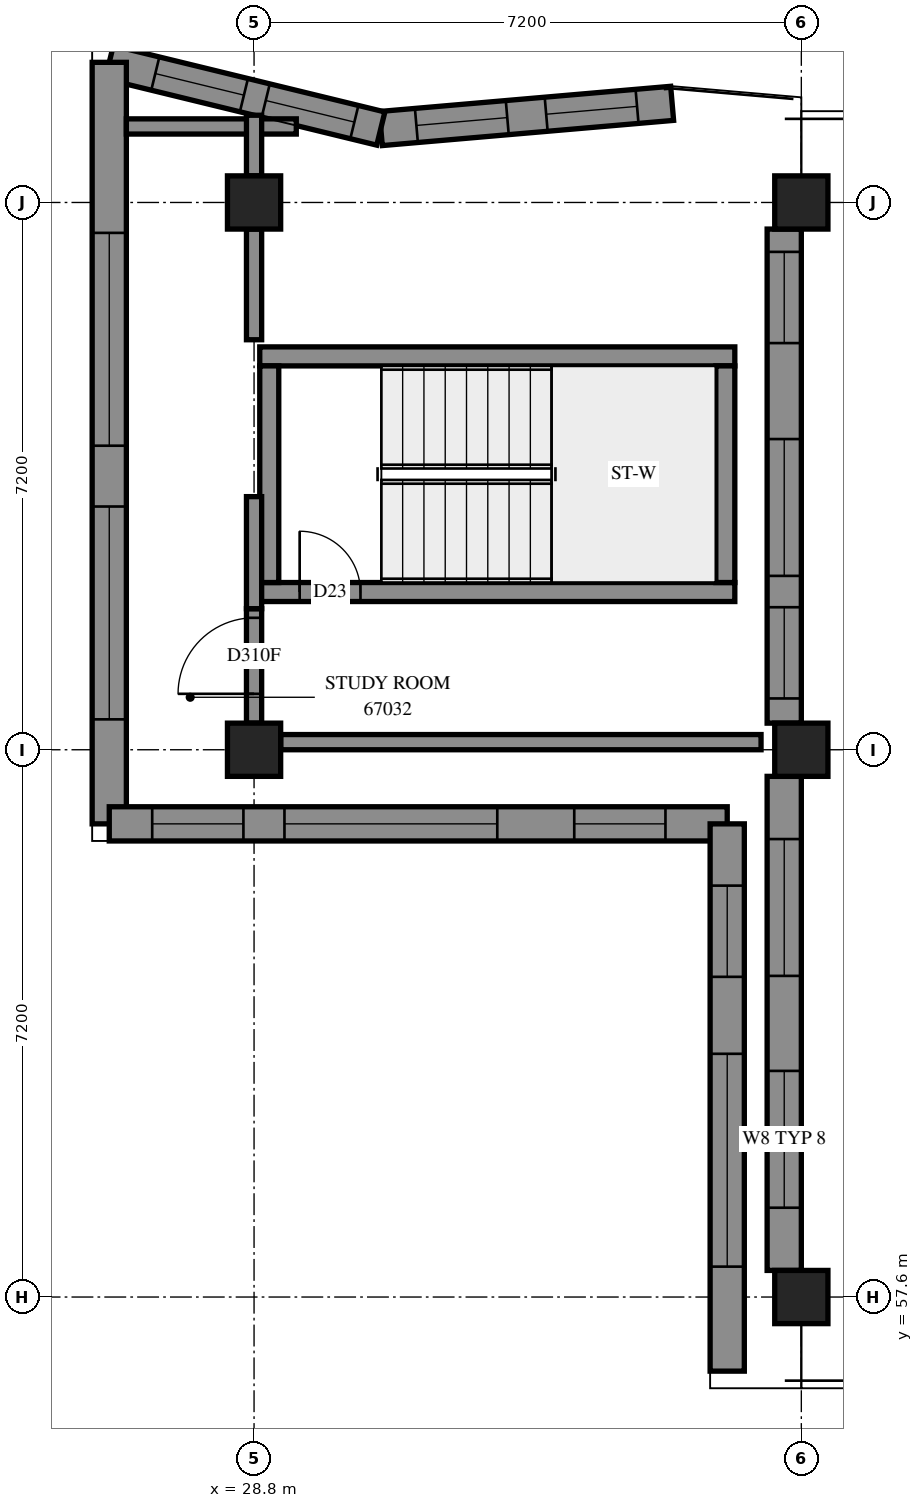
"""IFC4 building model, lengths in metres.
Left out: names, types, materials, properties, quantities, classifications, styles, units other than length and angle.
Written with IfcOpenShell. Run it as: python <this file> out.ifc"""

import sys

from ifc_helpers import new_model, si_unit, direction, frame, frame_2d, origin, origin_2d, place, context, subcontext, project, spatial, polyline, rectangle, outline, extrude, element, fill, save


model = new_model("IFC4")
c1 = context("Model", 3, precision=1e-05, world=origin(), true_north=direction((0.0, 1.0)))
c2 = subcontext(c1, "Body", "Model", "MODEL_VIEW")
j1 = project(units=[si_unit("LENGTHUNIT", "METRE"), si_unit("PLANEANGLEUNIT", "RADIAN")], contexts=[c1])
p1 = place(None, origin())
s1 = spatial("IfcSite", under=j1, at=p1, CompositionType="ELEMENT")
p2 = place(p1, origin())
s2 = spatial("IfcBuilding", under=s1, at=p2, CompositionType="ELEMENT")
p3 = place(p2, frame((0.0, 0.0, 247.2)))
s3 = spatial("IfcBuildingStorey", under=s2, at=p3, CompositionType="ELEMENT", Elevation=247.2)
for number, where, z_axis, x_axis in (
    (1, (28.8, 64.8, 0.0), (0.0, 0.0, 1.0), (1.0, 0.0, 0.0)),
    (2, (28.8, 72.0, 0.0), (0.0, 0.0, 1.0), (1.0, 0.0, 0.0)),
    (3, (36.0, 57.6, 0.0), (0.0, 0.0, 1.0), (1.0, 0.0, 0.0)),
    (4, (36.0, 64.8, 0.0), (0.0, 0.0, 1.0), (1.0, 0.0, 0.0)),
    (5, (36.0, 72.0, 0.0), (0.0, 0.0, 1.0), (1.0, 0.0, 0.0)),
):
    element("IfcColumn", number, at=place(p3, frame(where, z_axis=z_axis, x_axis=x_axis)), inside=s3, PredefinedType="COLUMN", context=c2, shape_type="SweptSolid", body=[
        extrude(rectangle(XDim=0.7, YDim=0.7, at=origin_2d()), origin(), (0.0, 0.0, 1.0), 3.1),
    ])
p4 = place(p3, frame((34.3, 73.304, 0.0), z_axis=(0.0, 0.0, 1.0), x_axis=(-0.9962799901, -0.0861752946, 0.0)))
e6 = element("IfcWall", 6, at=p4, inside=s3, PredefinedType="SOLIDWALL", context=c2, shape_type="SweptSolid", body=[
    extrude(outline(polyline([(-0.019, -0.225), (3.81, -0.225), (3.884, 0.225), (0.019, 0.225), (-0.019, -0.225)])), origin(), (0.0, 0.0, 1.0), 3.1),
])
p5 = place(p4, frame((0.463, 0.0, 0.45)))
e7 = element("IfcOpeningElement", 7, at=p5, cuts=e6, PredefinedType="OPENING", context=c2, shape_type="SweptSolid", body=[
    extrude(rectangle(XDim=1.2, YDim=2.55, at=frame_2d((0.6, 1.275))), frame((0.0, 0.235, 0.0), z_axis=(0.0, -1.0, 0.0), x_axis=(1.0, 0.0, 0.0)), (0.0, 0.0, 1.0), 0.47),
])
p6 = place(p4, frame((2.177, 0.0, 0.45)))
e8 = element("IfcOpeningElement", 8, at=p6, cuts=e6, PredefinedType="OPENING", context=c2, shape_type="SweptSolid", body=[
    extrude(rectangle(XDim=1.2, YDim=2.55, at=frame_2d((0.6, 1.275))), frame((0.0, 0.235, 0.0), z_axis=(0.0, -1.0, 0.0), x_axis=(1.0, 0.0, 0.0)), (0.0, 0.0, 1.0), 0.47),
])
p7 = place(p3, frame((30.468, 72.973, 0.0), z_axis=(0.0, 0.0, 1.0), x_axis=(-0.9715525461, 0.236824091, 0.0)))
e9 = element("IfcWall", 9, at=p7, inside=s3, PredefinedType="SOLIDWALL", context=c2, shape_type="SweptSolid", body=[
    extrude(outline(polyline([(0.037, -0.225), (3.964, -0.225), (3.391, 0.225), (-0.037, 0.225), (0.037, -0.225)])), origin(), (0.0, 0.0, 1.0), 3.1),
])
p8 = place(p7, frame((0.358, 0.0, 0.45)))
e10 = element("IfcOpeningElement", 10, at=p8, cuts=e9, PredefinedType="OPENING", context=c2, shape_type="SweptSolid", body=[
    extrude(rectangle(XDim=1.2, YDim=2.55, at=frame_2d((0.6, 1.275))), frame((0.0, 0.235, 0.0), z_axis=(0.0, -1.0, 0.0), x_axis=(1.0, 0.0, 0.0)), (0.0, 0.0, 1.0), 0.47),
])
p9 = place(p7, frame((1.854, 0.0, 0.45)))
e11 = element("IfcOpeningElement", 11, at=p9, cuts=e9, PredefinedType="OPENING", context=c2, shape_type="SweptSolid", body=[
    extrude(rectangle(XDim=1.2, YDim=2.55, at=frame_2d((0.6, 1.275))), frame((0.0, 0.235, 0.0), z_axis=(0.0, -1.0, 0.0), x_axis=(1.0, 0.0, 0.0)), (0.0, 0.0, 1.0), 0.47),
])
p10 = place(p3, frame((26.895, 73.844, 0.0), z_axis=(0.0, 0.0, 1.0), x_axis=(0.0, -1.0, 0.0)))
e12 = element("IfcWall", 12, at=p10, inside=s3, PredefinedType="SOLIDWALL", context=c2, shape_type="SweptSolid", body=[
    extrude(outline(polyline([(-0.286, -0.225), (10.244, -0.225), (9.794, 0.225), (0.286, 0.225), (-0.286, -0.225)])), origin(), (0.0, 0.0, 1.0), 3.1),
])
p11 = place(p10, frame((2.244, 0.0, 0.45)))
e13 = element("IfcOpeningElement", 13, at=p11, cuts=e12, PredefinedType="OPENING", context=c2, shape_type="SweptSolid", body=[
    extrude(rectangle(XDim=2.8, YDim=2.55, at=frame_2d((1.4, 1.275))), frame((0.0, 0.235, 0.0), z_axis=(0.0, -1.0, 0.0), x_axis=(1.0, 0.0, 0.0)), (0.0, 0.0, 1.0), 0.47),
])
p12 = place(p10, frame((5.844, 0.0, 0.45)))
e14 = element("IfcOpeningElement", 14, at=p12, cuts=e12, PredefinedType="OPENING", context=c2, shape_type="SweptSolid", body=[
    extrude(rectangle(XDim=2.8, YDim=2.55, at=frame_2d((1.4, 1.275))), frame((0.0, 0.235, 0.0), z_axis=(0.0, -1.0, 0.0), x_axis=(1.0, 0.0, 0.0)), (0.0, 0.0, 1.0), 0.47),
])
p13 = place(p3, frame((26.895, 63.825, 0.0), z_axis=(0.0, 0.0, 1.0), x_axis=(1.0, 0.0, 0.0)))
e15 = element("IfcWall", 15, at=p13, inside=s3, PredefinedType="SOLIDWALL", context=c2, shape_type="SweptSolid", body=[
    extrude(outline(polyline([(-0.225, -0.225), (7.905, -0.225), (8.355, 0.225), (0.225, 0.225), (-0.225, -0.225)])), origin(), (0.0, 0.0, 1.0), 3.1),
])
p14 = place(p13, frame((2.305, 0.0, 0.45)))
e16 = element("IfcOpeningElement", 16, at=p14, cuts=e15, PredefinedType="OPENING", context=c2, shape_type="SweptSolid", body=[
    extrude(rectangle(XDim=2.8, YDim=2.55, at=frame_2d((1.4, 1.275))), frame((0.0, 0.235, 0.0), z_axis=(0.0, -1.0, 0.0), x_axis=(1.0, 0.0, 0.0)), (0.0, 0.0, 1.0), 0.47),
])
p15 = place(p13, frame((0.565, 0.0, 0.45)))
e17 = element("IfcOpeningElement", 17, at=p15, cuts=e15, PredefinedType="OPENING", context=c2, shape_type="SweptSolid", body=[
    extrude(rectangle(XDim=1.2, YDim=2.55, at=frame_2d((0.6, 1.275))), frame((0.0, 0.235, 0.0), z_axis=(0.0, -1.0, 0.0), x_axis=(1.0, 0.0, 0.0)), (0.0, 0.0, 1.0), 0.47),
])
p16 = place(p13, frame((6.117, 0.0, 0.45)))
e18 = element("IfcOpeningElement", 18, at=p16, cuts=e15, PredefinedType="OPENING", context=c2, shape_type="SweptSolid", body=[
    extrude(rectangle(XDim=1.2, YDim=2.55, at=frame_2d((0.6, 1.275))), frame((0.0, 0.235, 0.0), z_axis=(0.0, -1.0, 0.0), x_axis=(1.0, 0.0, 0.0)), (0.0, 0.0, 1.0), 0.47),
])
p17 = place(p3, frame((35.025, 63.825, 0.0), z_axis=(0.0, 0.0, 1.0), x_axis=(0.0, -1.0, 0.0)))
e19 = element("IfcWall", 19, at=p17, inside=s3, PredefinedType="SOLIDWALL", context=c2, shape_type="SweptSolid", body=[
    extrude(outline(polyline([(0.225, -0.225), (7.425, -0.225), (6.975, 0.225), (-0.225, 0.225), (0.225, -0.225)])), origin(), (0.0, 0.0, 1.0), 3.1),
])
p18 = place(p17, frame((3.025, 0.0, 0.45)))
e20 = element("IfcOpeningElement", 20, at=p18, cuts=e19, PredefinedType="OPENING", context=c2, shape_type="SweptSolid", body=[
    extrude(rectangle(XDim=2.8, YDim=2.55, at=frame_2d((1.4, 1.275))), frame((0.0, 0.235, 0.0), z_axis=(0.0, -1.0, 0.0), x_axis=(1.0, 0.0, 0.0)), (0.0, 0.0, 1.0), 0.47),
])
p19 = place(p17, frame((0.812, 0.0, 0.45)))
e21 = element("IfcOpeningElement", 21, at=p19, cuts=e19, PredefinedType="OPENING", context=c2, shape_type="SweptSolid", body=[
    extrude(rectangle(XDim=1.2, YDim=2.55, at=frame_2d((0.6, 1.275))), frame((0.0, 0.235, 0.0), z_axis=(0.0, -1.0, 0.0), x_axis=(1.0, 0.0, 0.0)), (0.0, 0.0, 1.0), 0.47),
])
p20 = place(p3, frame((35.775, 57.95, 0.0), z_axis=(0.0, 0.0, 1.0), x_axis=(0.0, 1.0, 0.0)))
e22 = element("IfcWall", 22, at=p20, inside=s3, PredefinedType="SOLIDWALL", context=c2, shape_type="SweptSolid", body=[
    extrude(rectangle(XDim=6.5, YDim=0.45, at=frame_2d((3.25, 0.0))), origin(), (0.0, 0.0, 1.0), 3.1),
])
p21 = place(p20, frame((0.825, 0.0, 0.7)))
e23 = element("IfcOpeningElement", 23, at=p21, cuts=e22, PredefinedType="OPENING", context=c2, shape_type="SweptSolid", body=[
    extrude(rectangle(XDim=1.8, YDim=1.8, at=frame_2d((0.9, 0.9))), frame((0.0, 0.235, 0.0), z_axis=(0.0, -1.0, 0.0), x_axis=(1.0, 0.0, 0.0)), (0.0, 0.0, 1.0), 0.47),
])
p22 = place(p20, frame((3.875, 0.0, 0.7)))
e24 = element("IfcOpeningElement", 24, at=p22, cuts=e22, PredefinedType="OPENING", context=c2, shape_type="SweptSolid", body=[
    extrude(rectangle(XDim=1.8, YDim=1.8, at=frame_2d((0.9, 0.9))), frame((0.0, 0.235, 0.0), z_axis=(0.0, -1.0, 0.0), x_axis=(1.0, 0.0, 0.0)), (0.0, 0.0, 1.0), 0.47),
])
p23 = place(p3, frame((35.775, 65.15, 0.0), z_axis=(0.0, 0.0, 1.0), x_axis=(0.0, 1.0, 0.0)))
e25 = element("IfcWall", 25, at=p23, inside=s3, PredefinedType="SOLIDWALL", context=c2, shape_type="SweptSolid", body=[
    extrude(rectangle(XDim=6.5, YDim=0.45, at=frame_2d((3.25, 0.0))), origin(), (0.0, 0.0, 1.0), 3.1),
])
p24 = place(p23, frame((0.325, 0.0, 0.6)))
e26 = element("IfcOpeningElement", 26, at=p24, cuts=e25, PredefinedType="OPENING", context=c2, shape_type="SweptSolid", body=[
    extrude(rectangle(XDim=1.2, YDim=1.9, at=frame_2d((0.6, 0.95))), frame((0.0, 0.235, 0.0), z_axis=(0.0, -1.0, 0.0), x_axis=(1.0, 0.0, 0.0)), (0.0, 0.0, 1.0), 0.47),
])
p25 = place(p23, frame((1.938, 0.0, 0.7)))
e27 = element("IfcOpeningElement", 27, at=p25, cuts=e25, PredefinedType="OPENING", context=c2, shape_type="SweptSolid", body=[
    extrude(rectangle(XDim=1.8, YDim=1.8, at=frame_2d((0.9, 0.9))), frame((0.0, 0.235, 0.0), z_axis=(0.0, -1.0, 0.0), x_axis=(1.0, 0.0, 0.0)), (0.0, 0.0, 1.0), 0.47),
])
p26 = place(p23, frame((5.0, 0.0, 0.6)))
e28 = element("IfcOpeningElement", 28, at=p26, cuts=e25, PredefinedType="OPENING", context=c2, shape_type="SweptSolid", body=[
    extrude(rectangle(XDim=1.2, YDim=1.9, at=frame_2d((0.6, 0.95))), frame((0.0, 0.235, 0.0), z_axis=(0.0, -1.0, 0.0), x_axis=(1.0, 0.0, 0.0)), (0.0, 0.0, 1.0), 0.47),
])
p27 = place(p3, frame((28.875, 66.875, -0.3), z_axis=(0.0, 0.0, 1.0), x_axis=(1.0, 0.0, 0.0)))
e29 = element("IfcWall", 29, at=p27, inside=s3, PredefinedType="SOLIDWALL", context=c2, shape_type="SweptSolid", body=[
    extrude(rectangle(XDim=6.25, YDim=0.25, at=frame_2d((3.125, 0.0))), origin(), (0.0, 0.0, 1.0), 3.4),
])
p28 = place(p27, frame((0.525, 0.0, 0.3)))
e30 = element("IfcOpeningElement", 30, at=p28, cuts=e29, PredefinedType="OPENING", context=c2, shape_type="SweptSolid", body=[
    extrude(rectangle(XDim=0.8, YDim=2.1, at=frame_2d((0.4, 1.05))), frame((0.0, 0.135, 0.0), z_axis=(0.0, -1.0, 0.0), x_axis=(1.0, 0.0, 0.0)), (0.0, 0.0, 1.0), 0.27),
])
p29 = place(p3, frame((28.875, 69.975, -0.3), z_axis=(0.0, 0.0, 1.0), x_axis=(1.0, 0.0, 0.0)))
e31 = element("IfcWall", 31, at=p29, inside=s3, PredefinedType="SOLIDWALL", context=c2, shape_type="SweptSolid", body=[
    extrude(rectangle(XDim=6.25, YDim=0.25, at=frame_2d((3.125, 0.0))), origin(), (0.0, 0.0, 1.0), 3.4),
])
for number, where, z_axis, x_axis in (
    (32, (29.0, 67.0, -0.3), (0.0, 0.0, 1.0), (0.0, 1.0, 0.0)),
    (33, (35.0, 67.0, -0.3), (0.0, 0.0, 1.0), (0.0, 1.0, 0.0)),
):
    element("IfcWall", number, at=place(p3, frame(where, z_axis=z_axis, x_axis=x_axis)), inside=s3, PredefinedType="SOLIDWALL", context=c2, shape_type="SweptSolid", body=[
        extrude(rectangle(XDim=2.85, YDim=0.25, at=frame_2d((1.425, 0.0))), origin(), (0.0, 0.0, 1.0), 3.4),
    ])
p30 = place(p3, frame((29.15, 64.9, 0.0), z_axis=(0.0, 0.0, 1.0), x_axis=(1.0, 0.0, 0.0)))
e34 = element("IfcWall", 34, at=p30, inside=s3, PredefinedType="PARTITIONING", context=c2, shape_type="SweptSolid", body=[
    extrude(rectangle(XDim=6.32, YDim=0.2, at=frame_2d((3.16, 0.0))), origin(), (0.0, 0.0, 1.0), 2.6),
])
p31 = place(p3, frame((27.12, 73.0, 0.0), z_axis=(0.0, 0.0, 1.0), x_axis=(1.0, 0.0, 0.0)))
e35 = element("IfcWall", 35, at=p31, inside=s3, PredefinedType="PARTITIONING", context=c2, shape_type="SweptSolid", body=[
    extrude(rectangle(XDim=2.236, YDim=0.2, at=frame_2d((1.118, 0.0))), origin(), (0.0, 0.0, 1.0), 3.1),
])
p32 = place(p3, frame((28.8, 65.15, 0.0), z_axis=(0.0, 0.0, 1.0), x_axis=(0.0, 1.0, 0.0)))
e36 = element("IfcWall", 36, at=p32, inside=s3, PredefinedType="PARTITIONING", context=c2, shape_type="SweptSolid", body=[
    extrude(rectangle(XDim=1.506, YDim=0.2, at=frame_2d((0.753, 0.0))), origin(), (0.0, 0.0, 1.0), 2.6),
])
p33 = place(p32, frame((0.386, 0.0, 0.0)))
e37 = element("IfcOpeningElement", 37, at=p33, cuts=e36, PredefinedType="OPENING", context=c2, shape_type="SweptSolid", body=[
    extrude(rectangle(XDim=1.0, YDim=2.1, at=frame_2d((0.5, 1.05))), frame((0.0, 0.11, 0.0), z_axis=(0.0, -1.0, 0.0), x_axis=(1.0, 0.0, 0.0)), (0.0, 0.0, 1.0), 0.22),
])
p34 = place(p3, frame((28.8, 70.194, 0.0), z_axis=(0.0, 0.0, 1.0), x_axis=(0.0, 1.0, 0.0)))
e38 = element("IfcWall", 38, at=p34, inside=s3, PredefinedType="PARTITIONING", context=c2, shape_type="SweptSolid", body=[
    extrude(rectangle(XDim=1.456, YDim=0.2, at=frame_2d((0.728, 0.0))), origin(), (0.0, 0.0, 1.0), 2.6),
])
p35 = place(p3, frame((28.8, 72.35, 0.0), z_axis=(0.0, 0.0, 1.0), x_axis=(0.0, 1.0, 0.0)))
e39 = element("IfcWall", 39, at=p35, inside=s3, PredefinedType="PARTITIONING", context=c2, shape_type="SweptSolid", body=[
    extrude(rectangle(XDim=0.798, YDim=0.2, at=frame_2d((0.399, 0.0))), origin(), (0.0, 0.0, 1.0), 3.1),
])
p36 = place(p3, frame((28.8, 68.13, 0.0), z_axis=(0.0, 0.0, 1.0), x_axis=(0.0, -1.0, 0.0)))
e40 = element("IfcWall", 40, at=p36, inside=s3, PredefinedType="PARTITIONING", context=c2, shape_type="SweptSolid", body=[
    extrude(rectangle(XDim=1.474, YDim=0.2, at=frame_2d((0.737, 0.0))), origin(), (0.0, 0.0, 1.0), 2.6),
])
p37 = place(p5, origin())
e41 = element("IfcWindow", 41, at=p37, inside=s3, PartitioningType="SINGLE_PANEL", PredefinedType="WINDOW", context=c2, shape_type="SweptSolid", body=[
    extrude(rectangle(XDim=1.2, YDim=2.55, at=frame_2d((0.6, 1.275))), frame((0.0, 0.205, 0.0), z_axis=(0.0, -1.0, 0.0), x_axis=(1.0, 0.0, 0.0)), (0.0, 0.0, 1.0), 0.06),
])
fill(e7, e41)
p38 = place(p6, origin())
e42 = element("IfcWindow", 42, at=p38, inside=s3, PartitioningType="SINGLE_PANEL", PredefinedType="WINDOW", context=c2, shape_type="SweptSolid", body=[
    extrude(rectangle(XDim=1.2, YDim=2.55, at=frame_2d((0.6, 1.275))), frame((0.0, 0.205, 0.0), z_axis=(0.0, -1.0, 0.0), x_axis=(1.0, 0.0, 0.0)), (0.0, 0.0, 1.0), 0.06),
])
fill(e8, e42)
p39 = place(p8, origin())
e43 = element("IfcWindow", 43, at=p39, inside=s3, PartitioningType="SINGLE_PANEL", PredefinedType="WINDOW", context=c2, shape_type="SweptSolid", body=[
    extrude(rectangle(XDim=1.2, YDim=2.55, at=frame_2d((0.6, 1.275))), frame((0.0, 0.105, 0.0), z_axis=(0.0, -1.0, 0.0), x_axis=(1.0, 0.0, 0.0)), (0.0, 0.0, 1.0), 0.06),
])
fill(e10, e43)
p40 = place(p9, origin())
e44 = element("IfcWindow", 44, at=p40, inside=s3, PartitioningType="SINGLE_PANEL", PredefinedType="WINDOW", context=c2, shape_type="SweptSolid", body=[
    extrude(rectangle(XDim=1.2, YDim=2.55, at=frame_2d((0.6, 1.275))), frame((0.0, 0.205, 0.0), z_axis=(0.0, -1.0, 0.0), x_axis=(1.0, 0.0, 0.0)), (0.0, 0.0, 1.0), 0.06),
])
fill(e11, e44)
p41 = place(p11, origin())
e45 = element("IfcWindow", 45, at=p41, inside=s3, PartitioningType="SINGLE_PANEL", PredefinedType="WINDOW", context=c2, shape_type="SweptSolid", body=[
    extrude(rectangle(XDim=2.8, YDim=2.55, at=frame_2d((1.4, 1.275))), frame((0.0, 0.205, 0.0), z_axis=(0.0, -1.0, 0.0), x_axis=(1.0, 0.0, 0.0)), (0.0, 0.0, 1.0), 0.06),
])
fill(e13, e45)
p42 = place(p12, origin())
e46 = element("IfcWindow", 46, at=p42, inside=s3, PartitioningType="SINGLE_PANEL", PredefinedType="WINDOW", context=c2, shape_type="SweptSolid", body=[
    extrude(rectangle(XDim=2.8, YDim=2.55, at=frame_2d((1.4, 1.275))), frame((0.0, 0.205, 0.0), z_axis=(0.0, -1.0, 0.0), x_axis=(1.0, 0.0, 0.0)), (0.0, 0.0, 1.0), 0.06),
])
fill(e14, e46)
p43 = place(p14, origin())
e47 = element("IfcWindow", 47, at=p43, inside=s3, PartitioningType="SINGLE_PANEL", PredefinedType="WINDOW", context=c2, shape_type="SweptSolid", body=[
    extrude(rectangle(XDim=2.8, YDim=2.55, at=frame_2d((1.4, 1.275))), frame((0.0, 0.205, 0.0), z_axis=(0.0, -1.0, 0.0), x_axis=(1.0, 0.0, 0.0)), (0.0, 0.0, 1.0), 0.06),
])
fill(e16, e47)
p44 = place(p15, origin())
e48 = element("IfcWindow", 48, at=p44, inside=s3, PartitioningType="SINGLE_PANEL", PredefinedType="WINDOW", context=c2, shape_type="SweptSolid", body=[
    extrude(rectangle(XDim=1.2, YDim=2.55, at=frame_2d((0.6, 1.275))), frame((0.0, 0.205, 0.0), z_axis=(0.0, -1.0, 0.0), x_axis=(1.0, 0.0, 0.0)), (0.0, 0.0, 1.0), 0.06),
])
fill(e17, e48)
p45 = place(p16, origin())
e49 = element("IfcWindow", 49, at=p45, inside=s3, PartitioningType="SINGLE_PANEL", PredefinedType="WINDOW", context=c2, shape_type="SweptSolid", body=[
    extrude(rectangle(XDim=1.2, YDim=2.55, at=frame_2d((0.6, 1.275))), frame((0.0, 0.205, 0.0), z_axis=(0.0, -1.0, 0.0), x_axis=(1.0, 0.0, 0.0)), (0.0, 0.0, 1.0), 0.06),
])
fill(e18, e49)
p46 = place(p18, origin())
e50 = element("IfcWindow", 50, at=p46, inside=s3, PartitioningType="SINGLE_PANEL", PredefinedType="WINDOW", context=c2, shape_type="SweptSolid", body=[
    extrude(rectangle(XDim=2.8, YDim=2.55, at=frame_2d((1.4, 1.275))), frame((0.0, 0.205, 0.0), z_axis=(0.0, -1.0, 0.0), x_axis=(1.0, 0.0, 0.0)), (0.0, 0.0, 1.0), 0.06),
])
fill(e20, e50)
p47 = place(p19, origin())
e51 = element("IfcWindow", 51, at=p47, inside=s3, PartitioningType="SINGLE_PANEL", PredefinedType="WINDOW", context=c2, shape_type="SweptSolid", body=[
    extrude(rectangle(XDim=1.2, YDim=2.55, at=frame_2d((0.6, 1.275))), frame((0.0, 0.205, 0.0), z_axis=(0.0, -1.0, 0.0), x_axis=(1.0, 0.0, 0.0)), (0.0, 0.0, 1.0), 0.06),
])
fill(e21, e51)
p48 = place(p21, origin())
e52 = element("IfcWindow", 52, at=p48, inside=s3, PartitioningType="SINGLE_PANEL", PredefinedType="WINDOW", context=c2, shape_type="SweptSolid", body=[
    extrude(rectangle(XDim=1.8, YDim=1.8, at=frame_2d((0.9, 0.9))), frame((0.0, 0.205, 0.0), z_axis=(0.0, -1.0, 0.0), x_axis=(1.0, 0.0, 0.0)), (0.0, 0.0, 1.0), 0.06),
])
fill(e23, e52)
p49 = place(p22, origin())
e53 = element("IfcWindow", 53, at=p49, inside=s3, PartitioningType="SINGLE_PANEL", PredefinedType="WINDOW", context=c2, shape_type="SweptSolid", body=[
    extrude(rectangle(XDim=1.8, YDim=1.8, at=frame_2d((0.9, 0.9))), frame((0.0, 0.205, 0.0), z_axis=(0.0, -1.0, 0.0), x_axis=(1.0, 0.0, 0.0)), (0.0, 0.0, 1.0), 0.06),
])
fill(e24, e53)
p50 = place(p28, origin())
e54 = element("IfcDoor", 54, at=p50, inside=s3, OperationType="SINGLE_SWING_LEFT", PredefinedType="DOOR", context=c2, shape_type="SweptSolid", body=[
    extrude(rectangle(XDim=0.8, YDim=2.1, at=frame_2d((0.4, 1.05))), frame((0.0, 0.025, 0.0), z_axis=(0.0, -1.0, 0.0), x_axis=(1.0, 0.0, 0.0)), (0.0, 0.0, 1.0), 0.05),
])
fill(e30, e54)
p51 = place(p33, origin())
e55 = element("IfcDoor", 55, at=p51, inside=s3, OperationType="SINGLE_SWING_RIGHT", PredefinedType="DOOR", context=c2, shape_type="SweptSolid", body=[
    extrude(rectangle(XDim=1.0, YDim=2.1, at=frame_2d((0.5, 1.05))), frame((0.0, 0.025, 0.0), z_axis=(0.0, -1.0, 0.0), x_axis=(1.0, 0.0, 0.0)), (0.0, 0.0, 1.0), 0.05),
])
fill(e37, e55)
p52 = place(p24, origin())
e56 = element("IfcWindow", 56, at=p52, inside=s3, PartitioningType="SINGLE_PANEL", PredefinedType="WINDOW", context=c2, shape_type="SweptSolid", body=[
    extrude(rectangle(XDim=1.2, YDim=1.9, at=frame_2d((0.6, 0.95))), frame((0.0, 0.205, 0.0), z_axis=(0.0, -1.0, 0.0), x_axis=(1.0, 0.0, 0.0)), (0.0, 0.0, 1.0), 0.06),
])
fill(e26, e56)
p53 = place(p25, origin())
e57 = element("IfcWindow", 57, at=p53, inside=s3, PartitioningType="SINGLE_PANEL", PredefinedType="WINDOW", context=c2, shape_type="SweptSolid", body=[
    extrude(rectangle(XDim=1.8, YDim=1.8, at=frame_2d((0.9, 0.9))), frame((0.0, 0.205, 0.0), z_axis=(0.0, -1.0, 0.0), x_axis=(1.0, 0.0, 0.0)), (0.0, 0.0, 1.0), 0.06),
])
fill(e27, e57)
p54 = place(p26, origin())
e58 = element("IfcWindow", 58, at=p54, inside=s3, PartitioningType="SINGLE_PANEL", PredefinedType="WINDOW", context=c2, shape_type="SweptSolid", body=[
    extrude(rectangle(XDim=1.2, YDim=1.9, at=frame_2d((0.6, 0.95))), frame((0.0, 0.205, 0.0), z_axis=(0.0, -1.0, 0.0), x_axis=(1.0, 0.0, 0.0)), (0.0, 0.0, 1.0), 0.06),
])
fill(e28, e58)
save(model, sys.argv[1])
